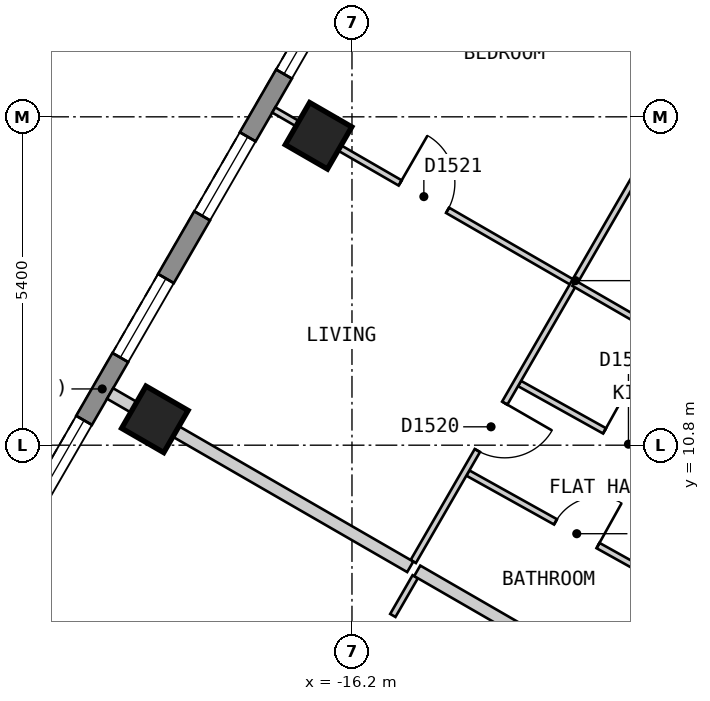
"""IFC4 building model, lengths in metres.
Left out: names, types, materials, properties, quantities, classifications, styles, units other than length and angle.
Written with IfcOpenShell. Run it as: python <this file> out.ifc"""

import sys

from ifc_helpers import new_model, si_unit, direction, frame, frame_2d, origin, origin_2d, place, context, subcontext, project, spatial, polyline, rectangle, outline, extrude, element, fill, save


model = new_model("IFC4")
c1 = context("Model", 3, precision=1e-05, world=origin(), true_north=direction((0.0, 1.0)))
c2 = subcontext(c1, "Body", "Model", "MODEL_VIEW")
j1 = project(units=[si_unit("LENGTHUNIT", "METRE"), si_unit("PLANEANGLEUNIT", "RADIAN")], contexts=[c1])
p1 = place(None, origin())
s1 = spatial("IfcSite", under=j1, at=p1, CompositionType="ELEMENT")
p2 = place(p1, origin())
s2 = spatial("IfcBuilding", under=s1, at=p2, CompositionType="ELEMENT")
p3 = place(p2, frame((0.0, 0.0, 190.2)))
s3 = spatial("IfcBuildingStorey", under=s2, at=p3, CompositionType="ELEMENT", Elevation=190.2)
for number, where, z_axis, x_axis in (
    (1, (-16.75, 15.888, 0.0), (0.0, 0.0, 1.0), (-0.5, -0.866, 0.0)),
    (2, (-19.442, 11.225, 0.0), (0.0, 0.0, 1.0), (-0.5, -0.866, 0.0)),
):
    element("IfcColumn", number, at=place(p3, frame(where, z_axis=z_axis, x_axis=x_axis)), inside=s3, PredefinedType="COLUMN", context=c2, shape_type="SweptSolid", body=[
        extrude(rectangle(XDim=0.8, YDim=0.8, at=origin_2d()), origin(), (0.0, 0.0, 1.0), 3.0),
    ])
p4 = place(p3, frame((-14.592, 21.625, 0.0), z_axis=(0.0, 0.0, 1.0), x_axis=(-0.500010537973, -0.866019319597, 0.0)))
e3 = element("IfcWall", 3, at=p4, inside=s3, PredefinedType="SOLIDWALL", context=c2, shape_type="SweptSolid", body=[
    extrude(outline(polyline([(0.0, -0.15), (22.863, -0.15), (22.783, 0.15), (0.08, 0.15), (0.0, -0.15)])), origin(), (0.0, 0.0, 1.0), 2.7),
])
p5 = place(p4, frame((1.259, 0.0, 0.15)))
e4 = element("IfcOpeningElement", 4, at=p5, cuts=e3, PredefinedType="OPENING", context=c2, shape_type="SweptSolid", body=[
    extrude(rectangle(XDim=1.5, YDim=2.1, at=frame_2d((0.75, 1.05))), frame((0.0, 0.16, 0.0), z_axis=(0.0, -1.0, 0.0), x_axis=(1.0, 0.0, 0.0)), (0.0, 0.0, 1.0), 0.32),
])
p6 = place(p4, frame((3.952, 0.0, 0.15)))
e5 = element("IfcOpeningElement", 5, at=p6, cuts=e3, PredefinedType="OPENING", context=c2, shape_type="SweptSolid", body=[
    extrude(rectangle(XDim=1.5, YDim=2.1, at=frame_2d((0.75, 1.05))), frame((0.0, 0.16, 0.0), z_axis=(0.0, -1.0, 0.0), x_axis=(1.0, 0.0, 0.0)), (0.0, 0.0, 1.0), 0.32),
])
p7 = place(p4, frame((6.644, 0.0, 0.15)))
e6 = element("IfcOpeningElement", 6, at=p7, cuts=e3, PredefinedType="OPENING", context=c2, shape_type="SweptSolid", body=[
    extrude(rectangle(XDim=1.5, YDim=2.1, at=frame_2d((0.75, 1.05))), frame((0.0, 0.16, 0.0), z_axis=(0.0, -1.0, 0.0), x_axis=(1.0, 0.0, 0.0)), (0.0, 0.0, 1.0), 0.32),
])
p8 = place(p4, frame((9.335, 0.0, 0.15)))
e7 = element("IfcOpeningElement", 7, at=p8, cuts=e3, PredefinedType="OPENING", context=c2, shape_type="SweptSolid", body=[
    extrude(rectangle(XDim=1.5, YDim=2.1, at=frame_2d((0.75, 1.05))), frame((0.0, 0.16, 0.0), z_axis=(0.0, -1.0, 0.0), x_axis=(1.0, 0.0, 0.0)), (0.0, 0.0, 1.0), 0.32),
])
p9 = place(p4, frame((12.028, 0.0, 0.15)))
e8 = element("IfcOpeningElement", 8, at=p9, cuts=e3, PredefinedType="OPENING", context=c2, shape_type="SweptSolid", body=[
    extrude(rectangle(XDim=1.5, YDim=2.1, at=frame_2d((0.75, 1.05))), frame((0.0, 0.16, 0.0), z_axis=(0.0, -1.0, 0.0), x_axis=(1.0, 0.0, 0.0)), (0.0, 0.0, 1.0), 0.32),
])
p10 = place(p4, frame((14.72, 0.0, 0.15)))
e9 = element("IfcOpeningElement", 9, at=p10, cuts=e3, PredefinedType="OPENING", context=c2, shape_type="SweptSolid", body=[
    extrude(rectangle(XDim=1.5, YDim=2.1, at=frame_2d((0.75, 1.05))), frame((0.0, 0.16, 0.0), z_axis=(0.0, -1.0, 0.0), x_axis=(1.0, 0.0, 0.0)), (0.0, 0.0, 1.0), 0.32),
])
p11 = place(p4, frame((17.411, 0.0, 0.15)))
e10 = element("IfcOpeningElement", 10, at=p11, cuts=e3, PredefinedType="OPENING", context=c2, shape_type="SweptSolid", body=[
    extrude(rectangle(XDim=1.5, YDim=2.1, at=frame_2d((0.75, 1.05))), frame((0.0, 0.16, 0.0), z_axis=(0.0, -1.0, 0.0), x_axis=(1.0, 0.0, 0.0)), (0.0, 0.0, 1.0), 0.32),
])
p12 = place(p4, frame((20.104, 0.0, 0.15)))
e11 = element("IfcOpeningElement", 11, at=p12, cuts=e3, PredefinedType="OPENING", context=c2, shape_type="SweptSolid", body=[
    extrude(rectangle(XDim=1.5, YDim=2.1, at=frame_2d((0.75, 1.05))), frame((0.0, 0.16, 0.0), z_axis=(0.0, -1.0, 0.0), x_axis=(1.0, 0.0, 0.0)), (0.0, 0.0, 1.0), 0.32),
])
p13 = place(p3, frame((-13.444, 11.814, 0.0), z_axis=(0.0, 0.0, 1.0), x_axis=(0.873653620945, -0.486548405207, 0.0)))
e12 = element("IfcWall", 12, at=p13, inside=s3, PredefinedType="PARTITIONING", context=c2, shape_type="SweptSolid", body=[
    extrude(rectangle(XDim=4.051, YDim=0.1, at=frame_2d((2.025, 0.0))), origin(), (0.0, 0.0, 1.0), 2.7),
])
p14 = place(p13, frame((1.6, 0.0, 0.0)))
e13 = element("IfcOpeningElement", 13, at=p14, cuts=e12, PredefinedType="OPENING", context=c2, shape_type="SweptSolid", body=[
    extrude(rectangle(XDim=0.9, YDim=2.1, at=frame_2d((0.45, 1.05))), frame((0.0, 0.06, 0.0), z_axis=(0.0, -1.0, 0.0), x_axis=(1.0, 0.0, 0.0)), (0.0, 0.0, 1.0), 0.12),
])
p15 = place(p3, frame((-14.294, 10.342, 0.0), z_axis=(0.0, 0.0, 1.0), x_axis=(0.873582256032, -0.486676527013, 0.0)))
e14 = element("IfcWall", 14, at=p15, inside=s3, PredefinedType="PARTITIONING", context=c2, shape_type="SweptSolid", body=[
    extrude(rectangle(XDim=4.05, YDim=0.1, at=frame_2d((2.025, 0.0))), origin(), (0.0, 0.0, 1.0), 2.7),
])
p16 = place(p15, frame((1.65, 0.0, 0.0)))
e15 = element("IfcOpeningElement", 15, at=p16, cuts=e14, PredefinedType="OPENING", context=c2, shape_type="SweptSolid", body=[
    extrude(rectangle(XDim=0.8, YDim=2.1, at=frame_2d((0.4, 1.05))), frame((0.0, 0.06, 0.0), z_axis=(0.0, -1.0, 0.0), x_axis=(1.0, 0.0, 0.0)), (0.0, 0.0, 1.0), 0.12),
])
p17 = place(p3, frame((-17.486, 16.313, 0.0), z_axis=(0.0, 0.0, 1.0), x_axis=(0.866004402611, -0.500036373335, 0.0)))
e16 = element("IfcWall", 16, at=p17, inside=s3, PredefinedType="PARTITIONING", context=c2, shape_type="SweptSolid", body=[
    extrude(rectangle(XDim=5.7, YDim=0.1, at=frame_2d((2.85, 0.0))), origin(), (0.0, 0.0, 1.0), 2.7),
])
p18 = place(p17, frame((2.4, 0.0, 0.0)))
e17 = element("IfcOpeningElement", 17, at=p18, cuts=e16, PredefinedType="OPENING", context=c2, shape_type="SweptSolid", body=[
    extrude(rectangle(XDim=0.9, YDim=2.1, at=frame_2d((0.45, 1.05))), frame((0.0, 0.06, 0.0), z_axis=(0.0, -1.0, 0.0), x_axis=(1.0, 0.0, 0.0)), (0.0, 0.0, 1.0), 0.12),
])
p19 = place(p3, frame((-15.528, 8.0, 0.0), z_axis=(0.0, 0.0, 1.0), x_axis=(0.500421336976, 0.865782008071, 0.0)))
e18 = element("IfcWall", 18, at=p19, inside=s3, PredefinedType="PARTITIONING", context=c2, shape_type="SweptSolid", body=[
    extrude(rectangle(XDim=0.736, YDim=0.1, at=frame_2d((0.368, 0.0))), origin(), (0.0, 0.0, 1.0), 2.7),
])
p20 = place(p3, frame((-15.192, 8.887, 0.0), z_axis=(0.0, 0.0, 1.0), x_axis=(0.500028204665, 0.866009119201, 0.0)))
e19 = element("IfcWall", 19, at=p20, inside=s3, PredefinedType="PARTITIONING", context=c2, shape_type="SweptSolid", body=[
    extrude(rectangle(XDim=10.667, YDim=0.1, at=frame_2d((5.334, 0.0))), origin(), (0.0, 0.0, 1.0), 2.7),
])
p21 = place(p20, frame((2.108, 0.0, 0.0)))
e20 = element("IfcOpeningElement", 20, at=p21, cuts=e19, PredefinedType="OPENING", context=c2, shape_type="SweptSolid", body=[
    extrude(rectangle(XDim=0.9, YDim=2.1, at=frame_2d((0.45, 1.05))), frame((0.0, 0.06, 0.0), z_axis=(0.0, -1.0, 0.0), x_axis=(1.0, 0.0, 0.0)), (0.0, 0.0, 1.0), 0.12),
])
p22 = place(p20, frame((7.576, 0.0, 0.0)))
e21 = element("IfcOpeningElement", 21, at=p22, cuts=e19, PredefinedType="OPENING", context=c2, shape_type="SweptSolid", body=[
    extrude(rectangle(XDim=0.8, YDim=2.1, at=frame_2d((0.4, 1.05))), frame((0.0, 0.06, 0.0), z_axis=(0.0, -1.0, 0.0), x_axis=(1.0, 0.0, 0.0)), (0.0, 0.0, 1.0), 0.12),
])
p23 = place(p3, frame((-20.178, 11.65, 0.0), z_axis=(0.0, 0.0, 1.0), x_axis=(0.866022950691, -0.500004248858, 0.0)))
e22 = element("IfcWall", 22, at=p23, inside=s3, PredefinedType="PARTITIONING", context=c2, shape_type="SweptSolid", body=[
    extrude(rectangle(XDim=5.7, YDim=0.2, at=frame_2d((2.85, 0.0))), origin(), (0.0, 0.0, 1.0), 2.7),
])
p24 = place(p3, frame((-15.127, 8.734, 0.0), z_axis=(0.0, 0.0, 1.0), x_axis=(0.865984601828, -0.500070664403, 0.0)))
e23 = element("IfcWall", 23, at=p24, inside=s3, PredefinedType="PARTITIONING", context=c2, shape_type="SweptSolid", body=[
    extrude(rectangle(XDim=4.167, YDim=0.2, at=frame_2d((2.084, 0.0))), origin(), (0.0, 0.0, 1.0), 2.7),
])
p25 = place(p3, frame((-12.55, 13.463, 0.0), z_axis=(0.0, 0.0, 1.0), x_axis=(0.86606561423, -0.499930346997, 0.0)))
e24 = element("IfcWall", 24, at=p25, inside=s3, PredefinedType="PARTITIONING", context=c2, shape_type="SweptSolid", body=[
    extrude(rectangle(XDim=4.1, YDim=0.1, at=frame_2d((2.05, 0.0))), origin(), (0.0, 0.0, 1.0), 2.7),
])
p26 = place(p6, origin())
e25 = element("IfcWindow", 25, at=p26, inside=s3, PartitioningType="SINGLE_PANEL", PredefinedType="WINDOW", context=c2, shape_type="SweptSolid", body=[
    extrude(rectangle(XDim=1.5, YDim=2.1, at=frame_2d((0.75, 1.05))), frame((0.0, 0.03, 0.0), z_axis=(0.0, -1.0, 0.0), x_axis=(1.0, 0.0, 0.0)), (0.0, 0.0, 1.0), 0.06),
])
fill(e5, e25)
p27 = place(p7, origin())
e26 = element("IfcWindow", 26, at=p27, inside=s3, PartitioningType="SINGLE_PANEL", PredefinedType="WINDOW", context=c2, shape_type="SweptSolid", body=[
    extrude(rectangle(XDim=1.5, YDim=2.1, at=frame_2d((0.75, 1.05))), frame((0.0, 0.03, 0.0), z_axis=(0.0, -1.0, 0.0), x_axis=(1.0, 0.0, 0.0)), (0.0, 0.0, 1.0), 0.06),
])
fill(e6, e26)
p28 = place(p8, origin())
e27 = element("IfcWindow", 27, at=p28, inside=s3, PartitioningType="SINGLE_PANEL", PredefinedType="WINDOW", context=c2, shape_type="SweptSolid", body=[
    extrude(rectangle(XDim=1.5, YDim=2.1, at=frame_2d((0.75, 1.05))), frame((0.0, 0.03, 0.0), z_axis=(0.0, -1.0, 0.0), x_axis=(1.0, 0.0, 0.0)), (0.0, 0.0, 1.0), 0.06),
])
fill(e7, e27)
p29 = place(p9, origin())
e28 = element("IfcWindow", 28, at=p29, inside=s3, PartitioningType="SINGLE_PANEL", PredefinedType="WINDOW", context=c2, shape_type="SweptSolid", body=[
    extrude(rectangle(XDim=1.5, YDim=2.1, at=frame_2d((0.75, 1.05))), frame((0.0, 0.03, 0.0), z_axis=(0.0, -1.0, 0.0), x_axis=(1.0, 0.0, 0.0)), (0.0, 0.0, 1.0), 0.06),
])
fill(e8, e28)
p30 = place(p16, origin())
e29 = element("IfcDoor", 29, at=p30, inside=s3, OperationType="SINGLE_SWING_RIGHT", PredefinedType="DOOR", context=c2, shape_type="SweptSolid", body=[
    extrude(rectangle(XDim=0.8, YDim=2.1, at=frame_2d((0.4, 1.05))), frame((0.0, 0.025, 0.0), z_axis=(0.0, -1.0, 0.0), x_axis=(1.0, 0.0, 0.0)), (0.0, 0.0, 1.0), 0.05),
])
fill(e15, e29)
p31 = place(p14, origin())
e30 = element("IfcDoor", 30, at=p31, inside=s3, OperationType="SINGLE_SWING_LEFT", PredefinedType="DOOR", context=c2, shape_type="SweptSolid", body=[
    extrude(rectangle(XDim=0.9, YDim=2.1, at=frame_2d((0.45, 1.05))), frame((0.0, 0.025, 0.0), z_axis=(0.0, -1.0, 0.0), x_axis=(1.0, 0.0, 0.0)), (0.0, 0.0, 1.0), 0.05),
])
fill(e13, e30)
p32 = place(p21, origin())
e31 = element("IfcDoor", 31, at=p32, inside=s3, OperationType="SINGLE_SWING_RIGHT", PredefinedType="DOOR", context=c2, shape_type="SweptSolid", body=[
    extrude(rectangle(XDim=0.9, YDim=2.1, at=frame_2d((0.45, 1.05))), frame((0.0, 0.025, 0.0), z_axis=(0.0, -1.0, 0.0), x_axis=(1.0, 0.0, 0.0)), (0.0, 0.0, 1.0), 0.05),
])
fill(e20, e31)
p33 = place(p18, origin())
e32 = element("IfcDoor", 32, at=p33, inside=s3, OperationType="SINGLE_SWING_LEFT", PredefinedType="DOOR", context=c2, shape_type="SweptSolid", body=[
    extrude(rectangle(XDim=0.9, YDim=2.1, at=frame_2d((0.45, 1.05))), frame((0.0, 0.025, 0.0), z_axis=(0.0, -1.0, 0.0), x_axis=(1.0, 0.0, 0.0)), (0.0, 0.0, 1.0), 0.05),
])
fill(e17, e32)
save(model, sys.argv[1])
